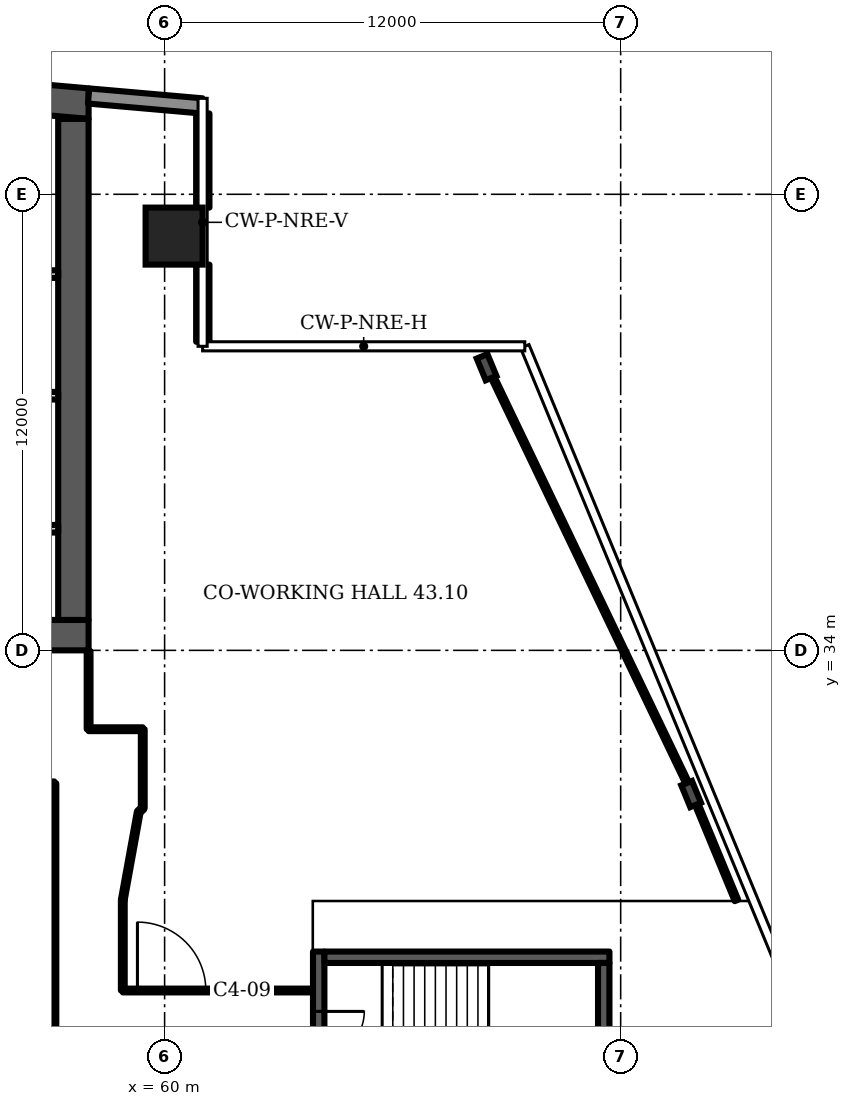
"""IFC4 building model, lengths in metres.
Left out: names, types, materials, properties, quantities, classifications, styles, units other than length and angle.
Written with IfcOpenShell. Run it as: python <this file> out.ifc"""

import sys

from ifc_helpers import new_model, si_unit, direction, frame, frame_2d, origin, origin_2d, place, context, subcontext, project, spatial, polyline, rectangle, i_section, outline, extrude, element, fill, save


model = new_model("IFC4")
c1 = context("Model", 3, precision=1e-05, world=origin(), true_north=direction((0.0, 1.0)))
c2 = subcontext(c1, "Body", "Model", "MODEL_VIEW")
j1 = project(units=[si_unit("LENGTHUNIT", "METRE"), si_unit("PLANEANGLEUNIT", "RADIAN")], contexts=[c1])
p1 = place(None, origin())
s1 = spatial("IfcSite", under=j1, at=p1, CompositionType="ELEMENT")
p2 = place(p1, origin())
s2 = spatial("IfcBuilding", under=s1, at=p2, CompositionType="ELEMENT")
p3 = place(p2, frame((0.0, 0.0, 177.1)))
s3 = spatial("IfcBuildingStorey", under=s2, at=p3, CompositionType="ELEMENT", Elevation=177.1)
p4 = place(p3, frame((0.0, 0.0, -0.0)))
e1 = element("IfcWall", 1, at=p4, inside=s3, PredefinedType="SHEAR", context=c2, shape_type="SweptSolid", body=[
    extrude(outline(polyline([(16.0, 47.984), (37.0, 49.822), (58.0, 47.984), (58.0, 48.787), (37.0, 50.625), (16.0, 48.787), (16.0, 47.984)])), origin(), (0.0, 0.0, 1.0), 3.6),
])
p5 = place(p3, frame((16.0, 34.4, 0.0), z_axis=(0.0, 0.0, 1.0), x_axis=(1.0, 0.0, 0.0)))
e2 = element("IfcWall", 2, at=p5, inside=s3, PredefinedType="SHEAR", context=c2, shape_type="SweptSolid", body=[
    extrude(rectangle(XDim=42.0, YDim=0.8, at=frame_2d((21.0, 0.0))), origin(), (0.0, 0.0, 1.0), 3.6),
])
p6 = place(p5, frame((1.75, 0.0, 0.0)))
e3 = element("IfcOpeningElement", 3, at=p6, cuts=e2, PredefinedType="OPENING", context=c2, shape_type="SweptSolid", body=[
    extrude(rectangle(XDim=1.0, YDim=2.1, at=frame_2d((0.5, 1.05))), frame((0.0, 0.41, 0.0), z_axis=(0.0, -1.0, 0.0), x_axis=(1.0, 0.0, 0.0)), (0.0, 0.0, 1.0), 0.82),
])
p7 = place(p5, frame((4.65, 0.0, 0.0)))
e4 = element("IfcOpeningElement", 4, at=p7, cuts=e2, PredefinedType="OPENING", context=c2, shape_type="SweptSolid", body=[
    extrude(rectangle(XDim=1.0, YDim=2.1, at=frame_2d((0.5, 1.05))), frame((0.0, 0.41, 0.0), z_axis=(0.0, -1.0, 0.0), x_axis=(1.0, 0.0, 0.0)), (0.0, 0.0, 1.0), 0.82),
])
p8 = place(p5, frame((7.65, 0.0, 0.0)))
e5 = element("IfcOpeningElement", 5, at=p8, cuts=e2, PredefinedType="OPENING", context=c2, shape_type="SweptSolid", body=[
    extrude(rectangle(XDim=1.2, YDim=2.1, at=frame_2d((0.6, 1.05))), frame((0.0, 0.41, 0.0), z_axis=(0.0, -1.0, 0.0), x_axis=(1.0, 0.0, 0.0)), (0.0, 0.0, 1.0), 0.82),
])
p9 = place(p5, frame((14.767, 0.0, 0.0)))
e6 = element("IfcOpeningElement", 6, at=p9, cuts=e2, PredefinedType="OPENING", context=c2, shape_type="SweptSolid", body=[
    extrude(rectangle(XDim=1.1, YDim=2.1, at=frame_2d((0.55, 1.05))), frame((0.0, 0.41, 0.0), z_axis=(0.0, -1.0, 0.0), x_axis=(1.0, 0.0, 0.0)), (0.0, 0.0, 1.0), 0.82),
])
p10 = place(p5, frame((19.133, 0.0, 0.0)))
e7 = element("IfcOpeningElement", 7, at=p10, cuts=e2, PredefinedType="OPENING", context=c2, shape_type="SweptSolid", body=[
    extrude(rectangle(XDim=1.1, YDim=2.1, at=frame_2d((0.55, 1.05))), frame((0.0, 0.41, 0.0), z_axis=(0.0, -1.0, 0.0), x_axis=(1.0, 0.0, 0.0)), (0.0, 0.0, 1.0), 0.82),
])
p11 = place(p5, frame((16.8, 0.0, 0.0)))
e8 = element("IfcOpeningElement", 8, at=p11, cuts=e2, PredefinedType="OPENING", context=c2, shape_type="SweptSolid", body=[
    extrude(rectangle(XDim=1.4, YDim=2.1, at=frame_2d((0.7, 1.05))), frame((0.0, 0.41, 0.0), z_axis=(0.0, -1.0, 0.0), x_axis=(1.0, 0.0, 0.0)), (0.0, 0.0, 1.0), 0.82),
])
p12 = place(p5, frame((21.767, 0.0, 0.0)))
e9 = element("IfcOpeningElement", 9, at=p12, cuts=e2, PredefinedType="OPENING", context=c2, shape_type="SweptSolid", body=[
    extrude(rectangle(XDim=1.1, YDim=2.1, at=frame_2d((0.55, 1.05))), frame((0.0, 0.41, 0.0), z_axis=(0.0, -1.0, 0.0), x_axis=(1.0, 0.0, 0.0)), (0.0, 0.0, 1.0), 0.82),
])
p13 = place(p5, frame((23.95, 0.0, 0.0)))
e10 = element("IfcOpeningElement", 10, at=p13, cuts=e2, PredefinedType="OPENING", context=c2, shape_type="SweptSolid", body=[
    extrude(rectangle(XDim=1.1, YDim=2.1, at=frame_2d((0.55, 1.05))), frame((0.0, 0.41, 0.0), z_axis=(0.0, -1.0, 0.0), x_axis=(1.0, 0.0, 0.0)), (0.0, 0.0, 1.0), 0.82),
])
p14 = place(p5, frame((26.133, 0.0, 0.0)))
e11 = element("IfcOpeningElement", 11, at=p14, cuts=e2, PredefinedType="OPENING", context=c2, shape_type="SweptSolid", body=[
    extrude(rectangle(XDim=1.1, YDim=2.1, at=frame_2d((0.55, 1.05))), frame((0.0, 0.41, 0.0), z_axis=(0.0, -1.0, 0.0), x_axis=(1.0, 0.0, 0.0)), (0.0, 0.0, 1.0), 0.82),
])
p15 = place(p5, frame((33.15, 0.0, 0.0)))
e12 = element("IfcOpeningElement", 12, at=p15, cuts=e2, PredefinedType="OPENING", context=c2, shape_type="SweptSolid", body=[
    extrude(rectangle(XDim=1.2, YDim=2.1, at=frame_2d((0.6, 1.05))), frame((0.0, 0.41, 0.0), z_axis=(0.0, -1.0, 0.0), x_axis=(1.0, 0.0, 0.0)), (0.0, 0.0, 1.0), 0.82),
])
p16 = place(p5, frame((35.817, 0.0, 0.0)))
e13 = element("IfcOpeningElement", 13, at=p16, cuts=e2, PredefinedType="OPENING", context=c2, shape_type="SweptSolid", body=[
    extrude(rectangle(XDim=1.0, YDim=2.1, at=frame_2d((0.5, 1.05))), frame((0.0, 0.41, 0.0), z_axis=(0.0, -1.0, 0.0), x_axis=(1.0, 0.0, 0.0)), (0.0, 0.0, 1.0), 0.82),
])
p17 = place(p5, frame((39.95, 0.0, 0.0)))
e14 = element("IfcOpeningElement", 14, at=p17, cuts=e2, PredefinedType="OPENING", context=c2, shape_type="SweptSolid", body=[
    extrude(rectangle(XDim=1.0, YDim=2.1, at=frame_2d((0.5, 1.05))), frame((0.0, 0.41, 0.0), z_axis=(0.0, -1.0, 0.0), x_axis=(1.0, 0.0, 0.0)), (0.0, 0.0, 1.0), 0.82),
])
p18 = place(p5, frame((37.767, 0.0, 0.0)))
e15 = element("IfcOpeningElement", 15, at=p18, cuts=e2, PredefinedType="OPENING", context=c2, shape_type="SweptSolid", body=[
    extrude(rectangle(XDim=1.4, YDim=2.1, at=frame_2d((0.7, 1.05))), frame((0.0, 0.41, 0.0), z_axis=(0.0, -1.0, 0.0), x_axis=(1.0, 0.0, 0.0)), (0.0, 0.0, 1.0), 0.82),
])
p19 = place(p3, frame((57.6, 34.8, 0.0), z_axis=(0.0, 0.0, 1.0), x_axis=(0.0, 1.0, 0.0)))
e16 = element("IfcWall", 16, at=p19, inside=s3, PredefinedType="SHEAR", context=c2, shape_type="SweptSolid", body=[
    extrude(rectangle(XDim=13.184, YDim=0.8, at=frame_2d((6.592, 0.0))), origin(), (0.0, 0.0, 1.0), 3.6),
])
p20 = place(p3, frame((60.25, 44.9, 0.0), z_axis=(0.0, 0.0, 1.0), x_axis=(1.0, 0.0, 0.0)))
e17 = element("IfcColumn", 17, at=p20, inside=s3, PredefinedType="COLUMN", context=c2, shape_type="SweptSolid", body=[
    extrude(rectangle(XDim=1.5, YDim=1.5, at=origin_2d()), origin(), (0.0, 0.0, 1.0), 3.6),
])
for number, where, z_axis, x_axis in (
    (18, (73.854, 30.219, 0.0), (0.0, 0.0, 1.0), (0.924, 0.382, 0.0)),
    (19, (68.472, 41.45, 0.0), (0.0, 0.0, 1.0), (0.924, 0.382, 0.0)),
):
    element("IfcColumn", number, at=place(p3, frame(where, z_axis=z_axis, x_axis=x_axis)), inside=s3, PredefinedType="COLUMN", context=c2, shape_type="SweptSolid", body=[
        extrude(i_section(OverallWidth=0.305, OverallDepth=0.62, WebThickness=0.021, FlangeThickness=0.04, FilletRadius=0.027, at=origin_2d()), origin(), (0.0, 0.0, 1.0), 3.6),
    ])
p21 = place(p3, frame((60.983, 48.326, 0.0), z_axis=(0.0, 0.0, 1.0), x_axis=(-0.996194, 0.087168, 0.0)))
e20 = element("IfcWall", 20, at=p21, inside=s3, PredefinedType="SOLIDWALL", context=c2, shape_type="SweptSolid", body=[
    extrude(rectangle(XDim=2.994, YDim=0.4, at=frame_2d((1.497, 0.0))), origin(), (0.0, 0.0, 1.0), 3.2),
])
p22 = place(p3, frame((61.005, 42.12, 0.0), z_axis=(0.0, 0.0, 1.0), x_axis=(0.0, 1.0, 0.0)))
e21 = element("IfcWall", 21, at=p22, inside=s3, PredefinedType="SOLIDWALL", context=c2, shape_type="SweptSolid", body=[
    extrude(rectangle(XDim=2.03, YDim=0.35, at=frame_2d((1.015, 0.0))), origin(), (0.0, 0.0, 1.0), 1.0),
])
p23 = place(p3, frame((61.005, 45.65, 0.0), z_axis=(0.0, 0.0, 1.0), x_axis=(0.0, 1.0, 0.0)))
e22 = element("IfcWall", 22, at=p23, inside=s3, PredefinedType="SOLIDWALL", context=c2, shape_type="SweptSolid", body=[
    extrude(rectangle(XDim=2.477, YDim=0.35, at=frame_2d((1.238, 0.0))), origin(), (0.0, 0.0, 1.0), 1.0),
])
p24 = place(p3, frame((55.7, 37.2, 0.0), z_axis=(0.0, 0.0, 1.0), x_axis=(1.0, 0.0, 0.0)))
e23 = element("IfcWall", 23, at=p24, inside=s3, PredefinedType="PARTITIONING", context=c2, shape_type="SweptSolid", body=[
    extrude(rectangle(XDim=1.5, YDim=0.2, at=frame_2d((0.75, 0.0))), origin(), (0.0, 0.0, 1.0), 3.2),
])
p25 = place(p24, frame((0.25, 0.0, 0.0)))
e24 = element("IfcOpeningElement", 24, at=p25, cuts=e23, PredefinedType="OPENING", context=c2, shape_type="SweptSolid", body=[
    extrude(rectangle(XDim=1.0, YDim=2.1, at=frame_2d((0.5, 1.05))), frame((0.0, 0.11, 0.0), z_axis=(0.0, -1.0, 0.0), x_axis=(1.0, 0.0, 0.0)), (0.0, 0.0, 1.0), 0.22),
])
p26 = place(p3, frame((51.4, 40.7, 0.0), z_axis=(0.0, 0.0, 1.0), x_axis=(1.0, 0.0, 0.0)))
e25 = element("IfcWall", 25, at=p26, inside=s3, PredefinedType="PARTITIONING", context=c2, shape_type="SweptSolid", body=[
    extrude(rectangle(XDim=5.8, YDim=0.2, at=frame_2d((2.9, 0.0))), origin(), (0.0, 0.0, 1.0), 3.2),
])
p27 = place(p26, frame((0.367, 0.0, 0.0)))
e26 = element("IfcOpeningElement", 26, at=p27, cuts=e25, PredefinedType="OPENING", context=c2, shape_type="SweptSolid", body=[
    extrude(rectangle(XDim=1.1, YDim=2.1, at=frame_2d((0.55, 1.05))), frame((0.0, 0.11, 0.0), z_axis=(0.0, -1.0, 0.0), x_axis=(1.0, 0.0, 0.0)), (0.0, 0.0, 1.0), 0.22),
])
p28 = place(p26, frame((3.417, 0.0, 0.0)))
e27 = element("IfcOpeningElement", 27, at=p28, cuts=e25, PredefinedType="OPENING", context=c2, shape_type="SweptSolid", body=[
    extrude(rectangle(XDim=1.0, YDim=2.1, at=frame_2d((0.5, 1.05))), frame((0.0, 0.11, 0.0), z_axis=(0.0, -1.0, 0.0), x_axis=(1.0, 0.0, 0.0)), (0.0, 0.0, 1.0), 0.22),
])
p29 = place(p3, frame((51.4, 43.9, 0.0), z_axis=(0.0, 0.0, 1.0), x_axis=(1.0, 0.0, 0.0)))
e28 = element("IfcWall", 28, at=p29, inside=s3, PredefinedType="PARTITIONING", context=c2, shape_type="SweptSolid", body=[
    extrude(rectangle(XDim=5.8, YDim=0.2, at=frame_2d((2.9, 0.0))), origin(), (0.0, 0.0, 1.0), 3.2),
])
p30 = place(p29, frame((3.417, 0.0, 0.0)))
e29 = element("IfcOpeningElement", 29, at=p30, cuts=e28, PredefinedType="OPENING", context=c2, shape_type="SweptSolid", body=[
    extrude(rectangle(XDim=1.0, YDim=2.1, at=frame_2d((0.5, 1.05))), frame((0.0, 0.11, 0.0), z_axis=(0.0, -1.0, 0.0), x_axis=(1.0, 0.0, 0.0)), (0.0, 0.0, 1.0), 0.22),
])
p31 = place(p3, frame((64.055, 21.725, 0.0), z_axis=(0.0, 0.0, 1.0), x_axis=(0.0, 1.0, 0.0)))
e30 = element("IfcWall", 30, at=p31, inside=s3, PredefinedType="SHEAR", context=c2, shape_type="SweptSolid", body=[
    extrude(rectangle(XDim=4.35, YDim=0.3, at=frame_2d((2.175, 0.0))), origin(), (0.0, 0.0, 1.0), 3.2),
])
p32 = place(p31, frame((1.575, 0.0, 0.0)))
e31 = element("IfcOpeningElement", 31, at=p32, cuts=e30, PredefinedType="OPENING", context=c2, shape_type="SweptSolid", body=[
    extrude(rectangle(XDim=1.2, YDim=2.1, at=frame_2d((0.6, 1.05))), frame((0.0, 0.16, 0.0), z_axis=(0.0, -1.0, 0.0), x_axis=(1.0, 0.0, 0.0)), (0.0, 0.0, 1.0), 0.32),
])
p33 = place(p3, frame((57.1, 11.985, 0.0), z_axis=(0.0, 0.0, 1.0), x_axis=(0.0, 1.0, 0.0)))
e32 = element("IfcWall", 32, at=p33, inside=s3, PredefinedType="PARTITIONING", context=c2, shape_type="SweptSolid", body=[
    extrude(rectangle(XDim=18.515, YDim=0.1, at=frame_2d((9.257, 0.0))), origin(), (0.0, 0.0, 1.0), 3.2),
])
p34 = place(p33, frame((8.295, 0.0, 0.0)))
e33 = element("IfcOpeningElement", 33, at=p34, cuts=e32, PredefinedType="OPENING", context=c2, shape_type="SweptSolid", body=[
    extrude(rectangle(XDim=1.8, YDim=2.1, at=frame_2d((0.9, 1.05))), frame((0.0, 0.06, 0.0), z_axis=(0.0, -1.0, 0.0), x_axis=(1.0, 0.0, 0.0)), (0.0, 0.0, 1.0), 0.12),
])
p35 = place(p3, frame((58.0, 31.925, 0.0), z_axis=(0.0, 0.0, 1.0), x_axis=(0.0, 1.0, 0.0)))
e34 = element("IfcWall", 34, at=p35, inside=s3, PredefinedType="PARTITIONING", context=c2, shape_type="SweptSolid", body=[
    extrude(rectangle(XDim=2.055, YDim=0.1, at=frame_2d((1.027, 0.0))), origin(), (0.0, 0.0, 1.0), 3.2),
])
p36 = place(p3, frame((58.0, 31.925, 0.0), z_axis=(0.0, 0.0, 1.0), x_axis=(1.0, 0.0, 0.0)))
e35 = element("IfcWall", 35, at=p36, inside=s3, PredefinedType="PARTITIONING", context=c2, shape_type="SweptSolid", body=[
    extrude(rectangle(XDim=1.425, YDim=0.1, at=frame_2d((0.712, 0.0))), origin(), (0.0, 0.0, 1.0), 3.2),
])
p37 = place(p3, frame((58.9, 25.05, 0.0), z_axis=(0.0, 0.0, 1.0), x_axis=(0.0, 1.0, 0.0)))
e36 = element("IfcWall", 36, at=p37, inside=s3, PredefinedType="PARTITIONING", context=c2, shape_type="SweptSolid", body=[
    extrude(rectangle(XDim=2.385, YDim=0.1, at=frame_2d((1.192, 0.0))), origin(), (0.0, 0.0, 1.0), 3.2),
])
p38 = place(p3, frame((58.9, 25.05, 0.0), z_axis=(0.0, 0.0, 1.0), x_axis=(1.0, 0.0, 0.0)))
e37 = element("IfcWall", 37, at=p38, inside=s3, PredefinedType="PARTITIONING", context=c2, shape_type="SweptSolid", body=[
    extrude(rectangle(XDim=4.985, YDim=0.1, at=frame_2d((2.492, 0.0))), origin(), (0.0, 0.0, 1.0), 3.2),
])
p39 = place(p38, frame((0.385, 0.0, 0.0)))
e38 = element("IfcOpeningElement", 38, at=p39, cuts=e37, PredefinedType="OPENING", context=c2, shape_type="SweptSolid", body=[
    extrude(rectangle(XDim=1.8, YDim=2.1, at=frame_2d((0.9, 1.05))), frame((0.0, 0.06, 0.0), z_axis=(0.0, -1.0, 0.0), x_axis=(1.0, 0.0, 0.0)), (0.0, 0.0, 1.0), 0.12),
])
p40 = place(p3, frame((58.9, 27.435, 0.0), z_axis=(0.0, 0.0, 1.0), x_axis=(0.178584, 0.983924, 0.0)))
e39 = element("IfcWall", 39, at=p40, inside=s3, PredefinedType="PARTITIONING", context=c2, shape_type="SweptSolid", body=[
    extrude(rectangle(XDim=2.353, YDim=0.1, at=frame_2d((1.176, 0.0))), origin(), (0.0, 0.0, 1.0), 3.2),
])
p41 = place(p3, frame((59.32, 29.75, 0.0), z_axis=(0.0, 0.0, 1.0), x_axis=(0.741581, 0.670872, 0.0)))
e40 = element("IfcWall", 40, at=p41, inside=s3, PredefinedType="PARTITIONING", context=c2, shape_type="SweptSolid", body=[
    extrude(rectangle(XDim=0.142, YDim=0.1, at=frame_2d((0.071, 0.0))), origin(), (0.0, 0.0, 1.0), 3.2),
])
p42 = place(p3, frame((59.425, 29.845, 0.0), z_axis=(0.0, 0.0, 1.0), x_axis=(0.0, 1.0, 0.0)))
e41 = element("IfcWall", 41, at=p42, inside=s3, PredefinedType="PARTITIONING", context=c2, shape_type="SweptSolid", body=[
    extrude(rectangle(XDim=2.08, YDim=0.1, at=frame_2d((1.04, 0.0))), origin(), (0.0, 0.0, 1.0), 3.2),
])
p43 = place(p3, frame((73.885, 30.23, 0.0), z_axis=(0.0, 0.0, 1.0), x_axis=(-0.432221, 0.901772, 0.0)))
e42 = element("IfcWall", 42, at=p43, inside=s3, PredefinedType="PARTITIONING", context=c2, shape_type="SweptSolid", body=[
    extrude(rectangle(XDim=12.459, YDim=0.1, at=frame_2d((6.229, 0.0))), origin(), (0.0, 0.0, 1.0), 3.2),
])
p44 = place(p3, frame((75.047, 27.42, 0.0), z_axis=(0.0, 0.0, 1.0), x_axis=(-0.382024, 0.924148, 0.0)))
e43 = element("IfcWall", 43, at=p44, inside=s3, PredefinedType="PARTITIONING", context=c2, shape_type="SweptSolid", body=[
    extrude(rectangle(XDim=3.041, YDim=0.1, at=frame_2d((1.521, 0.0))), origin(), (0.0, 0.0, 1.0), 2.58),
])
p45 = place(p3, frame((44.15, 30.5, 0.0), z_axis=(0.0, 0.0, 1.0), x_axis=(1.0, 0.0, 0.0)))
e44 = element("IfcWall", 44, at=p45, inside=s3, PredefinedType="PARTITIONING", context=c2, shape_type="SweptSolid", body=[
    extrude(rectangle(XDim=12.95, YDim=0.1, at=frame_2d((6.475, 0.0))), origin(), (0.0, 0.0, 1.0), 3.2),
])
p46 = place(p45, frame((3.17, 0.0, 0.0)))
e45 = element("IfcOpeningElement", 45, at=p46, cuts=e44, PredefinedType="OPENING", context=c2, shape_type="SweptSolid", body=[
    extrude(rectangle(XDim=1.8, YDim=2.1, at=frame_2d((0.9, 1.05))), frame((0.0, 0.06, 0.0), z_axis=(0.0, -1.0, 0.0), x_axis=(1.0, 0.0, 0.0)), (0.0, 0.0, 1.0), 0.12),
])
p47 = place(p3, frame((64.205, 25.925, 0.0), z_axis=(0.0, 0.0, 1.0), x_axis=(1.0, 0.0, 0.0)))
e46 = element("IfcWall", 46, at=p47, inside=s3, PredefinedType="SHEAR", context=c2, shape_type="SweptSolid", body=[
    extrude(rectangle(XDim=7.5, YDim=0.3, at=frame_2d((3.75, 0.0))), origin(), (0.0, 0.0, 1.0), 3.2),
])
p48 = place(p3, frame((71.555, 22.025, 0.0), z_axis=(0.0, 0.0, 1.0), x_axis=(0.0, 1.0, 0.0)))
e47 = element("IfcWall", 47, at=p48, inside=s3, PredefinedType="SHEAR", context=c2, shape_type="SweptSolid", body=[
    extrude(rectangle(XDim=3.75, YDim=0.3, at=frame_2d((1.875, 0.0))), origin(), (0.0, 0.0, 1.0), 3.2),
])
p49 = place(p32, origin())
e48 = element("IfcDoor", 48, at=p49, inside=s3, OperationType="SINGLE_SWING_RIGHT", PredefinedType="DOOR", context=c2, shape_type="SweptSolid", body=[
    extrude(rectangle(XDim=1.2, YDim=2.1, at=frame_2d((0.6, 1.05))), frame((0.0, 0.025, 0.0), z_axis=(0.0, -1.0, 0.0), x_axis=(1.0, 0.0, 0.0)), (0.0, 0.0, 1.0), 0.05),
])
fill(e31, e48)
p50 = place(p39, origin())
e49 = element("IfcDoor", 49, at=p50, inside=s3, OperationType="DOUBLE_DOOR_SINGLE_SWING", PredefinedType="DOOR", context=c2, shape_type="SweptSolid", body=[
    extrude(rectangle(XDim=1.8, YDim=2.1, at=frame_2d((0.9, 1.05))), frame((0.0, 0.025, 0.0), z_axis=(0.0, -1.0, 0.0), x_axis=(1.0, 0.0, 0.0)), (0.0, 0.0, 1.0), 0.05),
])
fill(e38, e49)
save(model, sys.argv[1])
